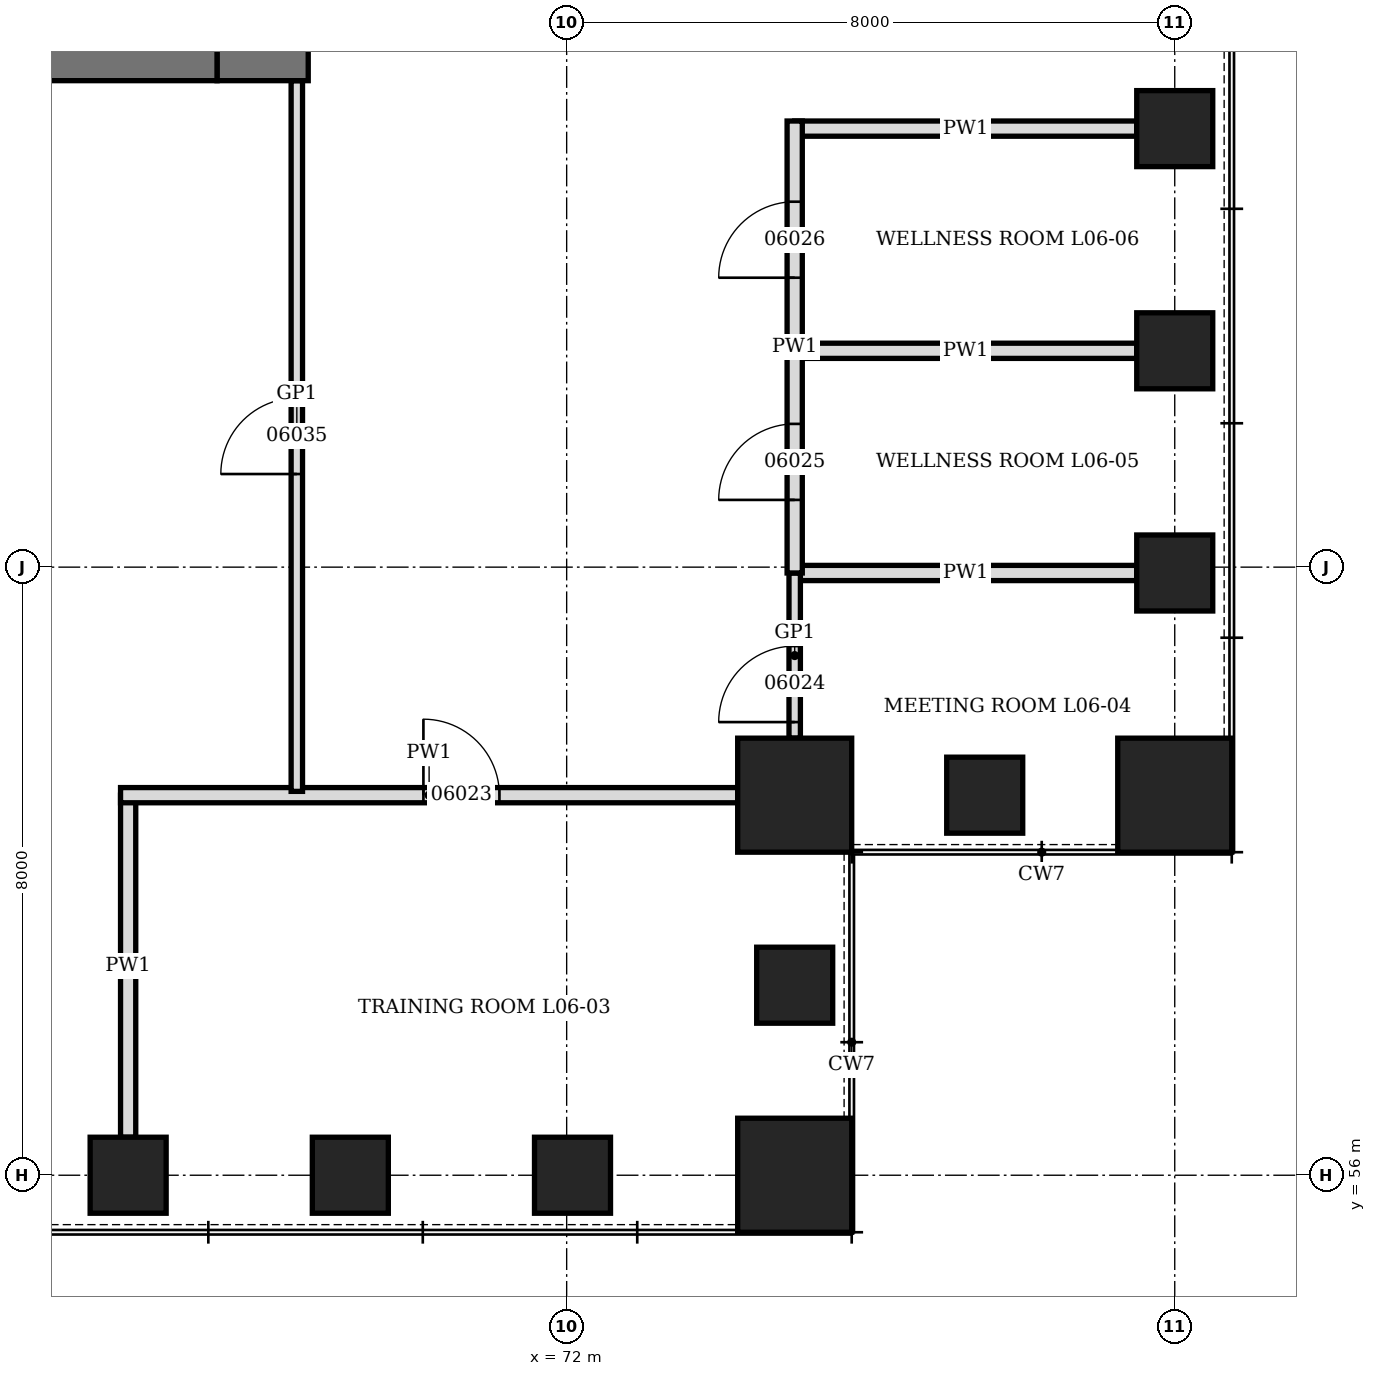
"""IFC4 building model, lengths in metres.
Left out: names, types, materials, properties, quantities, classifications, styles, units other than length and angle.
Written with IfcOpenShell. Run it as: python <this file> out.ifc"""

import sys

from ifc_helpers import new_model, si_unit, direction, frame, frame_2d, origin, origin_2d, place, context, subcontext, project, spatial, rectangle, hollow_rectangle, extrude, element, fill, save


model = new_model("IFC4")
c1 = context("Model", 3, precision=1e-05, world=origin(), true_north=direction((0.0, 1.0)))
c2 = subcontext(c1, "Body", "Model", "MODEL_VIEW")
j1 = project(units=[si_unit("LENGTHUNIT", "METRE"), si_unit("PLANEANGLEUNIT", "RADIAN")], contexts=[c1])
p1 = place(None, origin())
s1 = spatial("IfcSite", under=j1, at=p1, CompositionType="ELEMENT")
p2 = place(p1, origin())
s2 = spatial("IfcBuilding", under=s1, at=p2, CompositionType="ELEMENT")
p3 = place(p2, frame((0.0, 0.0, 34.9)))
s3 = spatial("IfcBuildingStorey", under=s2, at=p3, CompositionType="ELEMENT", Elevation=34.9)
for number, where, z_axis, x_axis in (
    (1, (66.231, 56.0, -0.3), (0.0, 0.0, 1.0), (1.0, 0.0, 0.0)),
    (2, (69.154, 56.0, -0.3), (0.0, 0.0, 1.0), (1.0, 0.0, 0.0)),
    (3, (72.077, 56.0, -0.3), (0.0, 0.0, 1.0), (1.0, 0.0, 0.0)),
):
    element("IfcColumn", number, at=place(p3, frame(where, z_axis=z_axis, x_axis=x_axis)), inside=s3, PredefinedType="COLUMN", context=c2, shape_type="SweptSolid", body=[
        extrude(hollow_rectangle(XDim=1.0, YDim=1.0, WallThickness=0.25, at=origin_2d()), origin(), (0.0, 0.0, 1.0), 4.5),
    ])
p4 = place(p3, frame((75.0, 56.0, -0.3), z_axis=(0.0, 0.0, 1.0), x_axis=(0.0, 1.0, 0.0)))
e4 = element("IfcColumn", 4, at=p4, inside=s3, PredefinedType="COLUMN", context=c2, shape_type="SweptSolid", body=[
    extrude(hollow_rectangle(XDim=1.5, YDim=1.5, WallThickness=0.6, at=origin_2d()), origin(), (0.0, 0.0, 1.0), 4.5),
])
p5 = place(p3, frame((75.0, 58.5, -0.3), z_axis=(0.0, 0.0, 1.0), x_axis=(0.0, 1.0, 0.0)))
e5 = element("IfcColumn", 5, at=p5, inside=s3, PredefinedType="COLUMN", context=c2, shape_type="SweptSolid", body=[
    extrude(hollow_rectangle(XDim=1.0, YDim=1.0, WallThickness=0.25, at=origin_2d()), origin(), (0.0, 0.0, 1.0), 4.5),
])
p6 = place(p3, frame((75.0, 61.0, -0.3), z_axis=(0.0, 0.0, 1.0), x_axis=(1.0, 0.0, 0.0)))
e6 = element("IfcColumn", 6, at=p6, inside=s3, PredefinedType="COLUMN", context=c2, shape_type="SweptSolid", body=[
    extrude(hollow_rectangle(XDim=1.5, YDim=1.5, WallThickness=0.6, at=origin_2d()), origin(), (0.0, 0.0, 1.0), 4.5),
])
p7 = place(p3, frame((77.5, 61.0, -0.3), z_axis=(0.0, 0.0, 1.0), x_axis=(1.0, 0.0, 0.0)))
e7 = element("IfcColumn", 7, at=p7, inside=s3, PredefinedType="COLUMN", context=c2, shape_type="SweptSolid", body=[
    extrude(hollow_rectangle(XDim=1.0, YDim=1.0, WallThickness=0.25, at=origin_2d()), origin(), (0.0, 0.0, 1.0), 4.5),
])
p8 = place(p3, frame((80.0, 61.0, -0.3), z_axis=(0.0, 0.0, 1.0), x_axis=(0.0, 1.0, 0.0)))
e8 = element("IfcColumn", 8, at=p8, inside=s3, PredefinedType="COLUMN", context=c2, shape_type="SweptSolid", body=[
    extrude(hollow_rectangle(XDim=1.5, YDim=1.5, WallThickness=0.6, at=origin_2d()), origin(), (0.0, 0.0, 1.0), 4.5),
])
for number, where, z_axis, x_axis in (
    (9, (80.0, 63.923, -0.3), (0.0, 0.0, 1.0), (0.0, 1.0, 0.0)),
    (10, (80.0, 66.846, -0.3), (0.0, 0.0, 1.0), (0.0, 1.0, 0.0)),
    (11, (80.0, 69.769, -0.3), (0.0, 0.0, 1.0), (0.0, 1.0, 0.0)),
):
    element("IfcColumn", number, at=place(p3, frame(where, z_axis=z_axis, x_axis=x_axis)), inside=s3, PredefinedType="COLUMN", context=c2, shape_type="SweptSolid", body=[
        extrude(hollow_rectangle(XDim=1.0, YDim=1.0, WallThickness=0.25, at=origin_2d()), origin(), (0.0, 0.0, 1.0), 4.5),
    ])
p9 = place(p3, frame((68.0, 70.4, 0.0), z_axis=(0.0, 0.0, 1.0), x_axis=(0.0, 1.0, 0.0)))
e12 = element("IfcWall", 12, at=p9, inside=s3, PredefinedType="SHEAR", context=c2, shape_type="SweptSolid", body=[
    extrude(rectangle(XDim=19.2, YDim=1.2, at=frame_2d((9.6, 0.0))), origin(), (0.0, 0.0, 1.0), 4.2),
])
p10 = place(p9, frame((8.6, 0.0, 0.0)))
e13 = element("IfcOpeningElement", 13, at=p10, cuts=e12, PredefinedType="OPENING", context=c2, shape_type="SweptSolid", body=[
    extrude(rectangle(XDim=2.0, YDim=2.4, at=frame_2d((1.0, 1.2))), frame((0.0, 0.61, 0.0), z_axis=(0.0, -1.0, 0.0), x_axis=(1.0, 0.0, 0.0)), (0.0, 0.0, 1.0), 1.22),
])
p11 = place(p3, frame((44.6, 71.0, 0.0), z_axis=(0.0, 0.0, 1.0), x_axis=(1.0, 0.0, 0.0)))
e14 = element("IfcWall", 14, at=p11, inside=s3, PredefinedType="SHEAR", context=c2, shape_type="SweptSolid", body=[
    extrude(rectangle(XDim=22.8, YDim=1.2, at=frame_2d((11.4, 0.0))), origin(), (0.0, 0.0, 1.0), 4.2),
])
p12 = place(p3, frame((66.231, 56.5, 0.0), z_axis=(0.0, 0.0, 1.0), x_axis=(0.0, 1.0, 0.0)))
e15 = element("IfcWall", 15, at=p12, inside=s3, PredefinedType="PARTITIONING", context=c2, shape_type="SweptSolid", body=[
    extrude(rectangle(XDim=4.5, YDim=0.2, at=frame_2d((2.25, 0.0))), origin(), (0.0, 0.0, 1.0), 3.278),
])
for number, where, z_axis, x_axis in (
    (16, (75.0, 63.923, 0.0), (0.0, 0.0, 1.0), (1.0, 0.0, 0.0)),
    (17, (75.0, 66.846, 0.0), (0.0, 0.0, 1.0), (1.0, 0.0, 0.0)),
    (18, (75.0, 69.769, 0.0), (0.0, 0.0, 1.0), (1.0, 0.0, 0.0)),
):
    element("IfcWall", number, at=place(p3, frame(where, z_axis=z_axis, x_axis=x_axis)), inside=s3, PredefinedType="PARTITIONING", context=c2, shape_type="SweptSolid", body=[
        extrude(rectangle(XDim=4.5, YDim=0.2, at=frame_2d((2.25, 0.0))), origin(), (0.0, 0.0, 1.0), 3.428),
    ])
p13 = place(p3, frame((66.131, 61.0, 0.0), z_axis=(0.0, 0.0, 1.0), x_axis=(1.0, 0.0, 0.0)))
e19 = element("IfcWall", 19, at=p13, inside=s3, PredefinedType="PARTITIONING", context=c2, shape_type="SweptSolid", body=[
    extrude(rectangle(XDim=8.119, YDim=0.2, at=frame_2d((4.06, 0.0))), origin(), (0.0, 0.0, 1.0), 4.04),
])
p14 = place(p13, frame((3.985, 0.0, 0.0)))
e20 = element("IfcOpeningElement", 20, at=p14, cuts=e19, PredefinedType="OPENING", context=c2, shape_type="SweptSolid", body=[
    extrude(rectangle(XDim=1.0, YDim=2.1, at=frame_2d((0.5, 1.05))), frame((0.0, 0.11, 0.0), z_axis=(0.0, -1.0, 0.0), x_axis=(1.0, 0.0, 0.0)), (0.0, 0.0, 1.0), 0.22),
])
p15 = place(p3, frame((68.45, 61.05, 0.0), z_axis=(0.0, 0.0, 1.0), x_axis=(0.0, 1.0, 0.0)))
e21 = element("IfcWall", 21, at=p15, inside=s3, PredefinedType="PARTITIONING", context=c2, shape_type="SweptSolid", body=[
    extrude(rectangle(XDim=9.35, YDim=0.15, at=frame_2d((4.675, 0.0))), origin(), (0.0, 0.0, 1.0), 4.04),
])
p16 = place(p15, frame((4.175, 0.0, 0.0)))
e22 = element("IfcOpeningElement", 22, at=p16, cuts=e21, PredefinedType="OPENING", context=c2, shape_type="SweptSolid", body=[
    extrude(rectangle(XDim=1.0, YDim=2.4, at=frame_2d((0.5, 1.2))), frame((0.0, 0.085, 0.0), z_axis=(0.0, -1.0, 0.0), x_axis=(1.0, 0.0, 0.0)), (0.0, 0.0, 1.0), 0.17),
])
p17 = place(p3, frame((75.0, 61.75, 0.0), z_axis=(0.0, 0.0, 1.0), x_axis=(0.0, 1.0, 0.0)))
e23 = element("IfcWall", 23, at=p17, inside=s3, PredefinedType="PARTITIONING", context=c2, shape_type="SweptSolid", body=[
    extrude(rectangle(XDim=2.173, YDim=0.15, at=frame_2d((1.086, 0.0))), origin(), (0.0, 0.0, 1.0), 4.04),
])
p18 = place(p17, frame((0.211, 0.0, 0.0)))
e24 = element("IfcOpeningElement", 24, at=p18, cuts=e23, PredefinedType="OPENING", context=c2, shape_type="SweptSolid", body=[
    extrude(rectangle(XDim=1.0, YDim=2.4, at=frame_2d((0.5, 1.2))), frame((0.0, 0.085, 0.0), z_axis=(0.0, -1.0, 0.0), x_axis=(1.0, 0.0, 0.0)), (0.0, 0.0, 1.0), 0.17),
])
p19 = place(p3, frame((75.0, 63.923, 0.0), z_axis=(0.0, 0.0, 1.0), x_axis=(0.0, 1.0, 0.0)))
e25 = element("IfcWall", 25, at=p19, inside=s3, PredefinedType="PARTITIONING", context=c2, shape_type="SweptSolid", body=[
    extrude(rectangle(XDim=5.946, YDim=0.2, at=frame_2d((2.973, 0.0))), origin(), (0.0, 0.0, 1.0), 4.04),
])
p20 = place(p19, frame((0.961, 0.0, 0.0)))
e26 = element("IfcOpeningElement", 26, at=p20, cuts=e25, PredefinedType="OPENING", context=c2, shape_type="SweptSolid", body=[
    extrude(rectangle(XDim=1.0, YDim=2.1, at=frame_2d((0.5, 1.05))), frame((0.0, 0.11, 0.0), z_axis=(0.0, -1.0, 0.0), x_axis=(1.0, 0.0, 0.0)), (0.0, 0.0, 1.0), 0.22),
])
p21 = place(p19, frame((3.885, 0.0, 0.0)))
e27 = element("IfcOpeningElement", 27, at=p21, cuts=e25, PredefinedType="OPENING", context=c2, shape_type="SweptSolid", body=[
    extrude(rectangle(XDim=1.0, YDim=2.1, at=frame_2d((0.5, 1.05))), frame((0.0, 0.11, 0.0), z_axis=(0.0, -1.0, 0.0), x_axis=(1.0, 0.0, 0.0)), (0.0, 0.0, 1.0), 0.22),
])
p22 = place(p14, origin())
e28 = element("IfcDoor", 28, at=p22, inside=s3, OperationType="SINGLE_SWING_LEFT", PredefinedType="DOOR", context=c2, shape_type="SweptSolid", body=[
    extrude(rectangle(XDim=1.0, YDim=2.1, at=frame_2d((0.5, 1.05))), frame((0.0, 0.1, 0.0), z_axis=(0.0, -1.0, 0.0), x_axis=(1.0, 0.0, 0.0)), (0.0, 0.0, 1.0), 0.199),
])
fill(e20, e28)
p23 = place(p18, origin())
e29 = element("IfcDoor", 29, at=p23, inside=s3, OperationType="SINGLE_SWING_RIGHT", PredefinedType="DOOR", context=c2, shape_type="SweptSolid", body=[
    extrude(rectangle(XDim=1.0, YDim=2.4, at=frame_2d((0.5, 1.2))), frame((0.0, 0.075, 0.0), z_axis=(0.0, -1.0, 0.0), x_axis=(1.0, 0.0, 0.0)), (0.0, 0.0, 1.0), 0.149),
])
fill(e24, e29)
p24 = place(p20, origin())
e30 = element("IfcDoor", 30, at=p24, inside=s3, OperationType="SINGLE_SWING_LEFT", PredefinedType="DOOR", context=c2, shape_type="SweptSolid", body=[
    extrude(rectangle(XDim=1.0, YDim=2.1, at=frame_2d((0.5, 1.05))), frame((0.0, 0.1, 0.0), z_axis=(0.0, -1.0, 0.0), x_axis=(1.0, 0.0, 0.0)), (0.0, 0.0, 1.0), 0.199),
])
fill(e26, e30)
p25 = place(p21, origin())
e31 = element("IfcDoor", 31, at=p25, inside=s3, OperationType="SINGLE_SWING_LEFT", PredefinedType="DOOR", context=c2, shape_type="SweptSolid", body=[
    extrude(rectangle(XDim=1.0, YDim=2.1, at=frame_2d((0.5, 1.05))), frame((0.0, 0.1, 0.0), z_axis=(0.0, -1.0, 0.0), x_axis=(1.0, 0.0, 0.0)), (0.0, 0.0, 1.0), 0.199),
])
fill(e27, e31)
p26 = place(p16, origin())
e32 = element("IfcDoor", 32, at=p26, inside=s3, OperationType="SINGLE_SWING_RIGHT", PredefinedType="DOOR", context=c2, shape_type="SweptSolid", body=[
    extrude(rectangle(XDim=1.0, YDim=2.4, at=frame_2d((0.5, 1.2))), frame((0.0, 0.075, 0.0), z_axis=(0.0, -1.0, 0.0), x_axis=(1.0, 0.0, 0.0)), (0.0, 0.0, 1.0), 0.149),
])
fill(e22, e32)
save(model, sys.argv[1])
